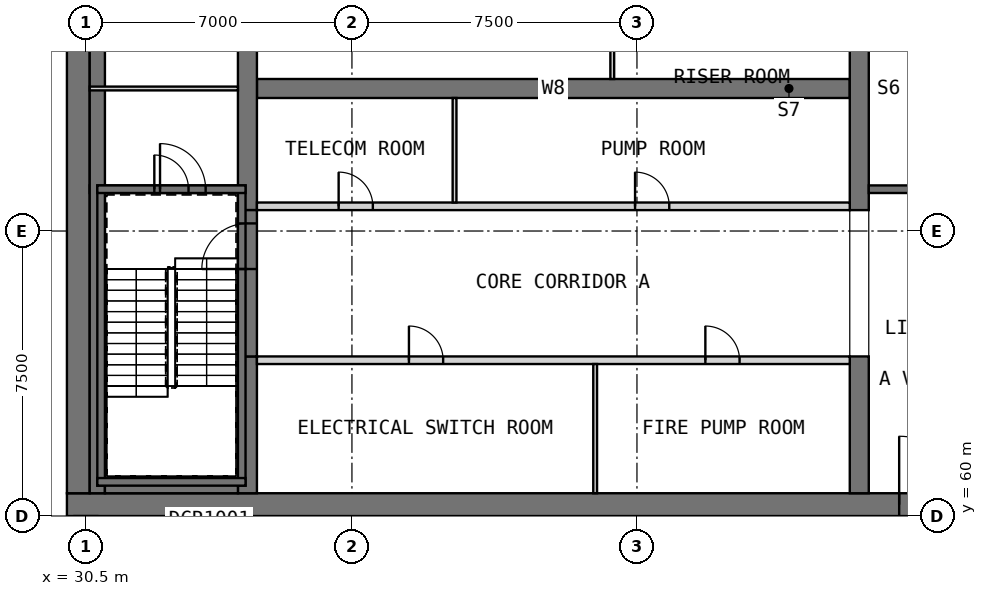
"""IFC4 building model, lengths in metres.
Left out: names, types, materials, properties, quantities, classifications, styles, units other than length and angle.
Written with IfcOpenShell. Run it as: python <this file> out.ifc"""

import sys

from ifc_helpers import new_model, si_unit, direction, frame, frame_2d, origin, place, context, subcontext, project, spatial, rectangle, extrude, element, fill, save


model = new_model("IFC4")
c1 = context("Model", 3, precision=1e-05, world=origin(), true_north=direction((0.0, 1.0)))
c2 = subcontext(c1, "Body", "Model", "MODEL_VIEW")
j1 = project(units=[si_unit("LENGTHUNIT", "METRE"), si_unit("PLANEANGLEUNIT", "RADIAN")], contexts=[c1])
p1 = place(None, origin())
s1 = spatial("IfcSite", under=j1, at=p1, CompositionType="ELEMENT")
p2 = place(p1, origin())
s2 = spatial("IfcBuilding", under=s1, at=p2, CompositionType="ELEMENT")
p3 = place(p2, frame((0.0, 0.0, 320.2)))
s3 = spatial("IfcBuildingStorey", under=s2, at=p3, CompositionType="ELEMENT", Elevation=320.2)
p4 = place(p3, frame((30.0, 60.3, 0.0), z_axis=(0.0, 0.0, 1.0), x_axis=(1.0, 0.0, 0.0)))
e1 = element("IfcWall", 1, at=p4, inside=s3, PredefinedType="SHEAR", context=c2, shape_type="SweptSolid", body=[
    extrude(rectangle(XDim=30.0, YDim=0.6, at=frame_2d((15.0, 0.0))), origin(), (0.0, 0.0, 1.0), 7.7),
])
p5 = place(p4, frame((21.9, 0.0, 0.0)))
e2 = element("IfcOpeningElement", 2, at=p5, cuts=e1, PredefinedType="OPENING", context=c2, shape_type="SweptSolid", body=[
    extrude(rectangle(XDim=1.8, YDim=2.1, at=frame_2d((0.9, 1.05))), frame((0.0, 0.31, 0.0), z_axis=(0.0, -1.0, 0.0), x_axis=(1.0, 0.0, 0.0)), (0.0, 0.0, 1.0), 0.62),
])
p6 = place(p4, frame((26.5, 0.0, 0.0)))
e3 = element("IfcOpeningElement", 3, at=p6, cuts=e1, PredefinedType="OPENING", context=c2, shape_type="SweptSolid", body=[
    extrude(rectangle(XDim=1.2, YDim=2.1, at=frame_2d((0.6, 1.05))), frame((0.0, 0.31, 0.0), z_axis=(0.0, -1.0, 0.0), x_axis=(1.0, 0.0, 0.0)), (0.0, 0.0, 1.0), 0.62),
])
p7 = place(p3, frame((30.3, 60.6, 0.0), z_axis=(0.0, 0.0, 1.0), x_axis=(0.0, 1.0, 0.0)))
e4 = element("IfcWall", 4, at=p7, inside=s3, PredefinedType="SHEAR", context=c2, shape_type="SweptSolid", body=[
    extrude(rectangle(XDim=21.3, YDim=0.6, at=frame_2d((10.65, 0.0))), origin(), (0.0, 0.0, 1.0), 7.7),
])
p8 = place(p3, frame((35.0, 71.25, 0.0), z_axis=(0.0, 0.0, 1.0), x_axis=(1.0, 0.0, 0.0)))
e5 = element("IfcWall", 5, at=p8, inside=s3, PredefinedType="SHEAR", context=c2, shape_type="SweptSolid", body=[
    extrude(rectangle(XDim=15.6, YDim=0.5, at=frame_2d((7.8, 0.0))), origin(), (0.0, 0.0, 1.0), 7.7),
])
p9 = place(p3, frame((34.75, 60.6, 0.0), z_axis=(0.0, 0.0, 1.0), x_axis=(0.0, 1.0, 0.0)))
e6 = element("IfcWall", 6, at=p9, inside=s3, PredefinedType="SHEAR", context=c2, shape_type="SweptSolid", body=[
    extrude(rectangle(XDim=3.6, YDim=0.5, at=frame_2d((1.8, 0.0))), origin(), (0.0, 0.0, 1.0), 7.7),
])
p10 = place(p3, frame((34.75, 68.05, 0.0), z_axis=(0.0, 0.0, 1.0), x_axis=(0.0, 1.0, 0.0)))
e7 = element("IfcWall", 7, at=p10, inside=s3, PredefinedType="SHEAR", context=c2, shape_type="SweptSolid", body=[
    extrude(rectangle(XDim=6.4, YDim=0.5, at=frame_2d((3.2, 0.0))), origin(), (0.0, 0.0, 1.0), 7.7),
])
p11 = place(p3, frame((50.85, 60.6, 0.0), z_axis=(0.0, 0.0, 1.0), x_axis=(0.0, 1.0, 0.0)))
e8 = element("IfcWall", 8, at=p11, inside=s3, PredefinedType="SHEAR", context=c2, shape_type="SweptSolid", body=[
    extrude(rectangle(XDim=3.6, YDim=0.5, at=frame_2d((1.8, 0.0))), origin(), (0.0, 0.0, 1.0), 7.7),
])
p12 = place(p3, frame((50.85, 68.05, 0.0), z_axis=(0.0, 0.0, 1.0), x_axis=(0.0, 1.0, 0.0)))
e9 = element("IfcWall", 9, at=p12, inside=s3, PredefinedType="SHEAR", context=c2, shape_type="SweptSolid", body=[
    extrude(rectangle(XDim=6.4, YDim=0.5, at=frame_2d((3.2, 0.0))), origin(), (0.0, 0.0, 1.0), 7.7),
])
p13 = place(p3, frame((35.0, 64.1, 0.0), z_axis=(0.0, 0.0, 1.0), x_axis=(1.0, 0.0, 0.0)))
e10 = element("IfcWall", 10, at=p13, inside=s3, PredefinedType="PARTITIONING", context=c2, shape_type="SweptSolid", body=[
    extrude(rectangle(XDim=15.6, YDim=0.2, at=frame_2d((7.8, 0.0))), origin(), (0.0, 0.0, 1.0), 7.7),
])
p14 = place(p13, frame((4.0, 0.0, 0.0)))
e11 = element("IfcOpeningElement", 11, at=p14, cuts=e10, PredefinedType="OPENING", context=c2, shape_type="SweptSolid", body=[
    extrude(rectangle(XDim=0.9, YDim=2.1, at=frame_2d((0.45, 1.05))), frame((0.0, 0.11, 0.0), z_axis=(0.0, -1.0, 0.0), x_axis=(1.0, 0.0, 0.0)), (0.0, 0.0, 1.0), 0.22),
])
p15 = place(p13, frame((11.8, 0.0, 0.0)))
e12 = element("IfcOpeningElement", 12, at=p15, cuts=e10, PredefinedType="OPENING", context=c2, shape_type="SweptSolid", body=[
    extrude(rectangle(XDim=0.9, YDim=2.1, at=frame_2d((0.45, 1.05))), frame((0.0, 0.11, 0.0), z_axis=(0.0, -1.0, 0.0), x_axis=(1.0, 0.0, 0.0)), (0.0, 0.0, 1.0), 0.22),
])
p16 = place(p3, frame((43.9, 60.6, 0.0), z_axis=(0.0, 0.0, 1.0), x_axis=(0.0, 1.0, 0.0)))
e13 = element("IfcWall", 13, at=p16, inside=s3, PredefinedType="PARTITIONING", context=c2, shape_type="SweptSolid", body=[
    extrude(rectangle(XDim=3.4, YDim=0.1, at=frame_2d((1.7, 0.0))), origin(), (0.0, 0.0, 1.0), 7.7),
])
p17 = place(p3, frame((35.0, 68.15, 0.0), z_axis=(0.0, 0.0, 1.0), x_axis=(1.0, 0.0, 0.0)))
e14 = element("IfcWall", 14, at=p17, inside=s3, PredefinedType="PARTITIONING", context=c2, shape_type="SweptSolid", body=[
    extrude(rectangle(XDim=15.6, YDim=0.2, at=frame_2d((7.8, 0.0))), origin(), (0.0, 0.0, 1.0), 7.7),
])
p18 = place(p17, frame((2.15, 0.0, 0.0)))
e15 = element("IfcOpeningElement", 15, at=p18, cuts=e14, PredefinedType="OPENING", context=c2, shape_type="SweptSolid", body=[
    extrude(rectangle(XDim=0.9, YDim=2.1, at=frame_2d((0.45, 1.05))), frame((0.0, 0.11, 0.0), z_axis=(0.0, -1.0, 0.0), x_axis=(1.0, 0.0, 0.0)), (0.0, 0.0, 1.0), 0.22),
])
p19 = place(p17, frame((9.95, 0.0, 0.0)))
e16 = element("IfcOpeningElement", 16, at=p19, cuts=e14, PredefinedType="OPENING", context=c2, shape_type="SweptSolid", body=[
    extrude(rectangle(XDim=0.9, YDim=2.1, at=frame_2d((0.45, 1.05))), frame((0.0, 0.11, 0.0), z_axis=(0.0, -1.0, 0.0), x_axis=(1.0, 0.0, 0.0)), (0.0, 0.0, 1.0), 0.22),
])
p20 = place(p3, frame((40.2, 68.25, 0.0), z_axis=(0.0, 0.0, 1.0), x_axis=(0.0, 1.0, 0.0)))
e17 = element("IfcWall", 17, at=p20, inside=s3, PredefinedType="PARTITIONING", context=c2, shape_type="SweptSolid", body=[
    extrude(rectangle(XDim=2.75, YDim=0.1, at=frame_2d((1.375, 0.0))), origin(), (0.0, 0.0, 1.0), 7.7),
])
p21 = place(p3, frame((44.35, 71.5, 0.0), z_axis=(0.0, 0.0, 1.0), x_axis=(0.0, 1.0, 0.0)))
e18 = element("IfcWall", 18, at=p21, inside=s3, PredefinedType="PARTITIONING", context=c2, shape_type="SweptSolid", body=[
    extrude(rectangle(XDim=2.0, YDim=0.1, at=frame_2d((1.0, 0.0))), origin(), (0.0, 0.0, 1.0), 7.7),
])
p22 = place(p3, frame((34.75, 64.2, 0.0), z_axis=(0.0, 0.0, 1.0), x_axis=(0.0, 1.0, 0.0)))
e19 = element("IfcWall", 19, at=p22, inside=s3, PredefinedType="SOLIDWALL", context=c2, shape_type="SweptSolid", body=[
    extrude(rectangle(XDim=3.85, YDim=0.5, at=frame_2d((1.925, 0.0))), origin(), (0.0, 0.0, 1.0), 6.5),
])
p23 = place(p22, frame((2.3, 0.0, 0.0)))
e20 = element("IfcOpeningElement", 20, at=p23, cuts=e19, PredefinedType="OPENING", context=c2, shape_type="SweptSolid", body=[
    extrude(rectangle(XDim=1.2, YDim=2.1, at=frame_2d((0.6, 1.05))), frame((0.0, 0.26, 0.0), z_axis=(0.0, -1.0, 0.0), x_axis=(1.0, 0.0, 0.0)), (0.0, 0.0, 1.0), 0.52),
])
p24 = place(p3, frame((30.6, 68.6, 0.0), z_axis=(0.0, 0.0, 1.0), x_axis=(1.0, 0.0, 0.0)))
e21 = element("IfcWall", 21, at=p24, inside=s3, PredefinedType="SOLIDWALL", context=c2, shape_type="SweptSolid", body=[
    extrude(rectangle(XDim=3.9, YDim=0.2, at=frame_2d((1.95, 0.0))), origin(), (0.0, 0.0, 1.0), 7.7),
])
p25 = place(p24, frame((1.7, 0.0, 0.0)))
e22 = element("IfcOpeningElement", 22, at=p25, cuts=e21, PredefinedType="OPENING", context=c2, shape_type="SweptSolid", body=[
    extrude(rectangle(XDim=0.9, YDim=2.1, at=frame_2d((0.45, 1.05))), frame((0.0, 0.11, 0.0), z_axis=(0.0, -1.0, 0.0), x_axis=(1.0, 0.0, 0.0)), (0.0, 0.0, 1.0), 0.22),
])
p26 = place(p3, frame((51.1, 68.6, 0.0), z_axis=(0.0, 0.0, 1.0), x_axis=(1.0, 0.0, 0.0)))
e23 = element("IfcWall", 23, at=p26, inside=s3, PredefinedType="SOLIDWALL", context=c2, shape_type="SweptSolid", body=[
    extrude(rectangle(XDim=8.3, YDim=0.2, at=frame_2d((4.15, 0.0))), origin(), (0.0, 0.0, 1.0), 7.7),
])
p27 = place(p3, frame((30.8, 60.6, 0.0), z_axis=(0.0, 0.0, 1.0), x_axis=(0.0, 1.0, 0.0)))
e24 = element("IfcWall", 24, at=p27, inside=s3, PredefinedType="SOLIDWALL", context=c2, shape_type="SweptSolid", body=[
    extrude(rectangle(XDim=21.3, YDim=0.4, at=frame_2d((10.65, 0.0))), origin(), (0.0, 0.0, 1.0), 7.7),
])
p28 = place(p3, frame((31.0, 60.8, 0.0), z_axis=(0.0, 0.0, 1.0), x_axis=(1.0, 0.0, 0.0)))
e25 = element("IfcWall", 25, at=p28, inside=s3, PredefinedType="SOLIDWALL", context=c2, shape_type="SweptSolid", body=[
    extrude(rectangle(XDim=3.5, YDim=0.4, at=frame_2d((1.75, 0.0))), origin(), (0.0, 0.0, 1.0), 7.7),
])
p29 = place(p3, frame((30.6, 71.25, 0.0), z_axis=(0.0, 0.0, 1.0), x_axis=(1.0, 0.0, 0.0)))
e26 = element("IfcWall", 26, at=p29, inside=s3, PredefinedType="PARTITIONING", context=c2, shape_type="SweptSolid", body=[
    extrude(rectangle(XDim=3.9, YDim=0.1, at=frame_2d((1.95, 0.0))), origin(), (0.0, 0.0, 1.0), 7.7),
])
for number, where, z_axis, x_axis in (
    (27, (30.9, 60.8, 8.0), (0.0, 0.0, 1.0), (0.0, 1.0, 0.0)),
    (28, (34.6, 60.8, 8.0), (0.0, 0.0, 1.0), (0.0, 1.0, 0.0)),
):
    element("IfcWall", number, at=place(p3, frame(where, z_axis=z_axis, x_axis=x_axis)), inside=s3, PredefinedType="SOLIDWALL", context=c2, shape_type="SweptSolid", body=[
        extrude(rectangle(XDim=7.9, YDim=0.2, at=frame_2d((3.95, 0.0))), origin(), (0.0, 0.0, 1.0), 2.7),
    ])
p30 = place(p3, frame((30.8, 68.6, 8.0), z_axis=(0.0, 0.0, 1.0), x_axis=(1.0, 0.0, 0.0)))
e29 = element("IfcWall", 29, at=p30, inside=s3, PredefinedType="SOLIDWALL", context=c2, shape_type="SweptSolid", body=[
    extrude(rectangle(XDim=3.9, YDim=0.2, at=frame_2d((1.95, 0.0))), origin(), (0.0, 0.0, 1.0), 2.7),
])
p31 = place(p30, frame((1.65, 0.0, 0.0)))
e30 = element("IfcOpeningElement", 30, at=p31, cuts=e29, PredefinedType="OPENING", context=c2, shape_type="SweptSolid", body=[
    extrude(rectangle(XDim=1.2, YDim=2.1, at=frame_2d((0.6, 1.05))), frame((0.0, 0.11, 0.0), z_axis=(0.0, -1.0, 0.0), x_axis=(1.0, 0.0, 0.0)), (0.0, 0.0, 1.0), 0.22),
])
p32 = place(p3, frame((30.8, 60.9, 8.0), z_axis=(0.0, 0.0, 1.0), x_axis=(1.0, 0.0, 0.0)))
e31 = element("IfcWall", 31, at=p32, inside=s3, PredefinedType="SOLIDWALL", context=c2, shape_type="SweptSolid", body=[
    extrude(rectangle(XDim=3.9, YDim=0.2, at=frame_2d((1.95, 0.0))), origin(), (0.0, 0.0, 1.0), 2.7),
])
p33 = place(p14, origin())
e32 = element("IfcDoor", 32, at=p33, inside=s3, OperationType="SINGLE_SWING_RIGHT", PredefinedType="DOOR", context=c2, shape_type="SweptSolid", body=[
    extrude(rectangle(XDim=0.9, YDim=2.1, at=frame_2d((0.45, 1.05))), frame((0.0, 0.025, 0.0), z_axis=(0.0, -1.0, 0.0), x_axis=(1.0, 0.0, 0.0)), (0.0, 0.0, 1.0), 0.05),
])
fill(e11, e32)
p34 = place(p15, origin())
e33 = element("IfcDoor", 33, at=p34, inside=s3, OperationType="SINGLE_SWING_LEFT", PredefinedType="DOOR", context=c2, shape_type="SweptSolid", body=[
    extrude(rectangle(XDim=0.9, YDim=2.1, at=frame_2d((0.45, 1.05))), frame((0.0, 0.025, 0.0), z_axis=(0.0, -1.0, 0.0), x_axis=(1.0, 0.0, 0.0)), (0.0, 0.0, 1.0), 0.05),
])
fill(e12, e33)
p35 = place(p18, origin())
e34 = element("IfcDoor", 34, at=p35, inside=s3, OperationType="SINGLE_SWING_RIGHT", PredefinedType="DOOR", context=c2, shape_type="SweptSolid", body=[
    extrude(rectangle(XDim=0.9, YDim=2.1, at=frame_2d((0.45, 1.05))), frame((0.0, 0.025, 0.0), z_axis=(0.0, -1.0, 0.0), x_axis=(1.0, 0.0, 0.0)), (0.0, 0.0, 1.0), 0.05),
])
fill(e15, e34)
p36 = place(p19, origin())
e35 = element("IfcDoor", 35, at=p36, inside=s3, OperationType="SINGLE_SWING_LEFT", PredefinedType="DOOR", context=c2, shape_type="SweptSolid", body=[
    extrude(rectangle(XDim=0.9, YDim=2.1, at=frame_2d((0.45, 1.05))), frame((0.0, 0.025, 0.0), z_axis=(0.0, -1.0, 0.0), x_axis=(1.0, 0.0, 0.0)), (0.0, 0.0, 1.0), 0.05),
])
fill(e16, e35)
p37 = place(p5, origin())
e36 = element("IfcDoor", 36, at=p37, inside=s3, OperationType="DOUBLE_DOOR_SINGLE_SWING", PredefinedType="DOOR", context=c2, shape_type="SweptSolid", body=[
    extrude(rectangle(XDim=1.8, YDim=2.1, at=frame_2d((0.9, 1.05))), frame((0.0, 0.025, 0.0), z_axis=(0.0, -1.0, 0.0), x_axis=(1.0, 0.0, 0.0)), (0.0, 0.0, 1.0), 0.05),
])
fill(e2, e36)
p38 = place(p23, origin())
e37 = element("IfcDoor", 37, at=p38, inside=s3, OperationType="SINGLE_SWING_LEFT", PredefinedType="DOOR", context=c2, shape_type="SweptSolid", body=[
    extrude(rectangle(XDim=1.2, YDim=2.1, at=frame_2d((0.6, 1.05))), frame((0.0, 0.025, 0.0), z_axis=(0.0, -1.0, 0.0), x_axis=(1.0, 0.0, 0.0)), (0.0, 0.0, 1.0), 0.05),
])
fill(e20, e37)
p39 = place(p25, origin())
e38 = element("IfcDoor", 38, at=p39, inside=s3, OperationType="SINGLE_SWING_LEFT", PredefinedType="DOOR", context=c2, shape_type="SweptSolid", body=[
    extrude(rectangle(XDim=0.9, YDim=2.1, at=frame_2d((0.45, 1.05))), frame((0.0, 0.025, 0.0), z_axis=(0.0, -1.0, 0.0), x_axis=(1.0, 0.0, 0.0)), (0.0, 0.0, 1.0), 0.05),
])
fill(e22, e38)
p40 = place(p31, origin())
e39 = element("IfcDoor", 39, at=p40, inside=s3, OperationType="SINGLE_SWING_RIGHT", PredefinedType="DOOR", context=c2, shape_type="SweptSolid", body=[
    extrude(rectangle(XDim=1.2, YDim=2.1, at=frame_2d((0.6, 1.05))), frame((0.0, 0.025, 0.0), z_axis=(0.0, -1.0, 0.0), x_axis=(1.0, 0.0, 0.0)), (0.0, 0.0, 1.0), 0.05),
])
fill(e30, e39)
save(model, sys.argv[1])
